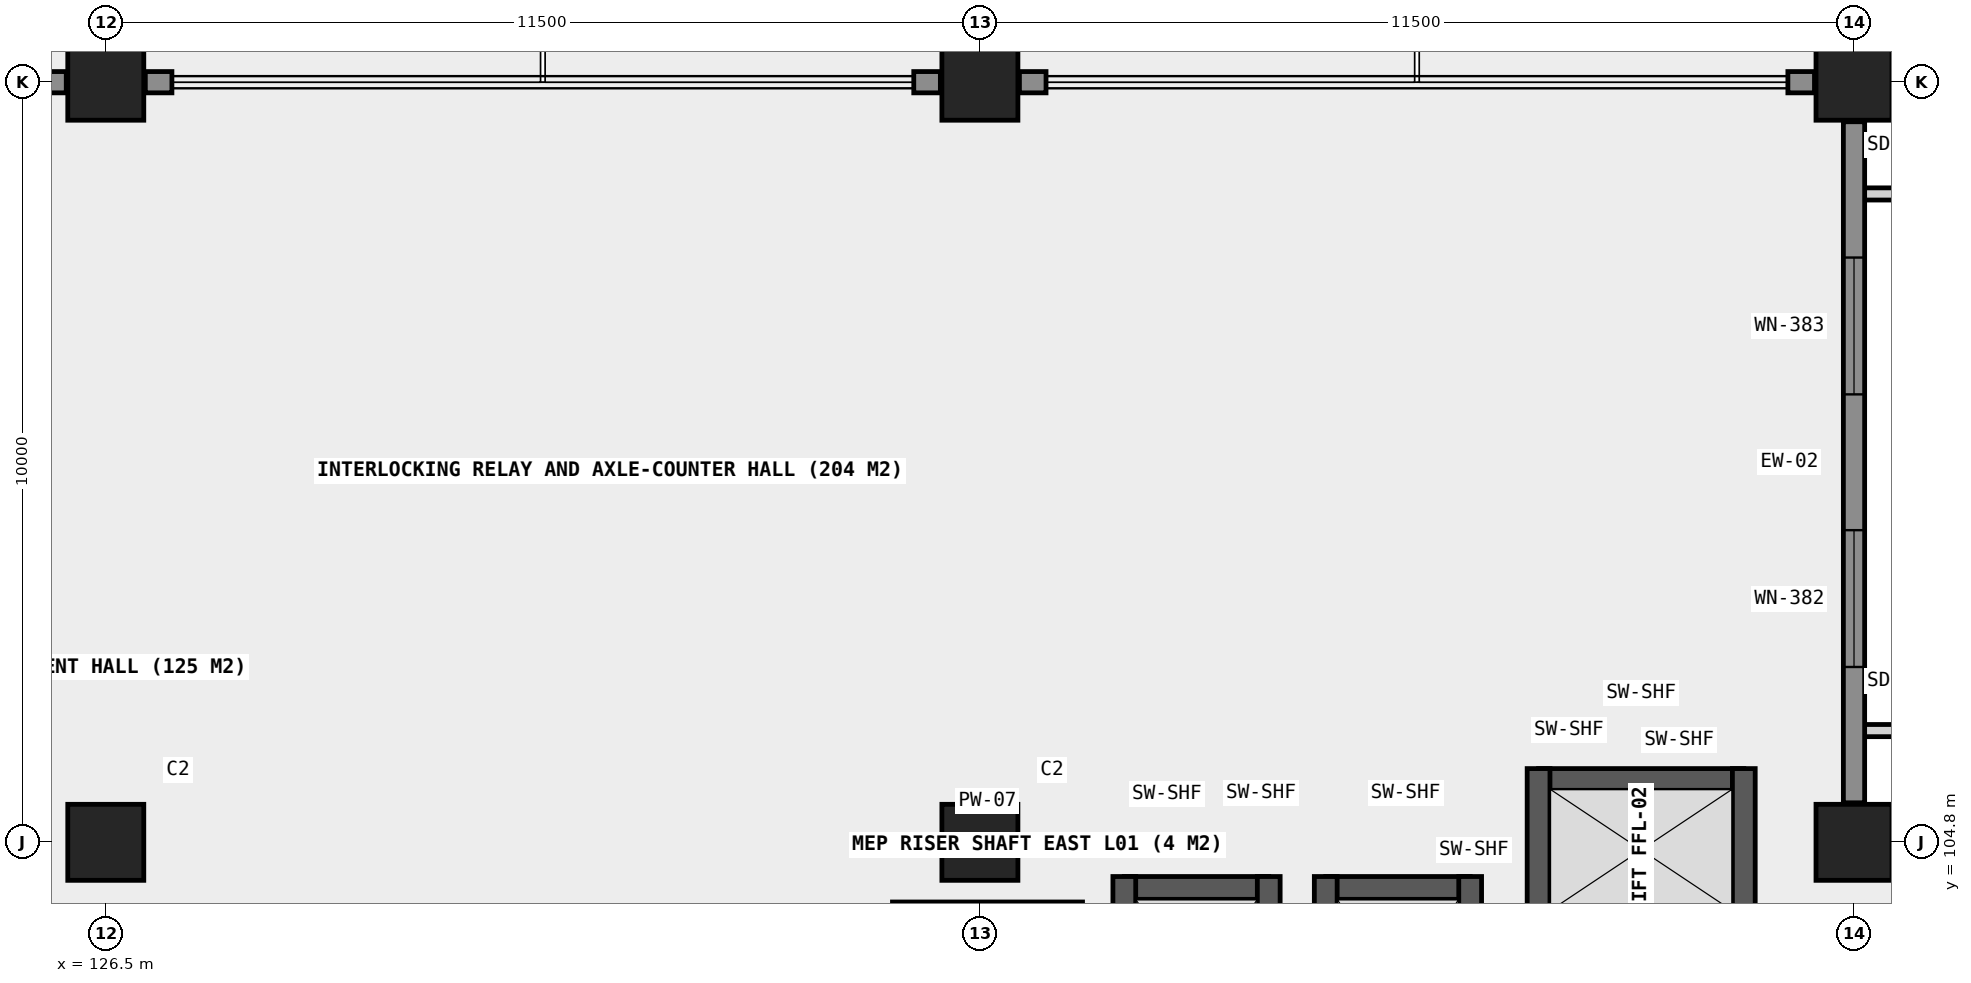
"""IFC4 building model, lengths in metres.
Left out: names, types, materials, properties, quantities, classifications, styles, units other than length and angle.
Written with IfcOpenShell. Run it as: python <this file> out.ifc"""

import sys

from ifc_helpers import new_model, si_unit, direction, frame, frame_2d, origin, origin_2d, place, context, subcontext, project, spatial, rectangle, extrude, element, fill, save


model = new_model("IFC4")
c1 = context("Model", 3, precision=1e-05, world=origin(), true_north=direction((0.0, 1.0)))
c2 = subcontext(c1, "Body", "Model", "MODEL_VIEW")
j1 = project(units=[si_unit("LENGTHUNIT", "METRE"), si_unit("PLANEANGLEUNIT", "RADIAN")], contexts=[c1])
p1 = place(None, origin())
s1 = spatial("IfcSite", under=j1, at=p1, CompositionType="ELEMENT")
p2 = place(p1, origin())
s2 = spatial("IfcBuilding", under=s1, at=p2, CompositionType="ELEMENT")
p3 = place(p2, frame((0.0, 0.0, 4.2)))
s3 = spatial("IfcBuildingStorey", under=s2, at=p3, CompositionType="ELEMENT", Elevation=4.2)
for number, where, z_axis, x_axis in (
    (1, (126.5, 104.8, 0.0), (0.0, 0.0, 1.0), (1.0, 0.0, 0.0)),
    (2, (126.5, 114.8, 0.0), (0.0, 0.0, 1.0), (1.0, 0.0, 0.0)),
    (3, (138.0, 104.8, 0.0), (0.0, 0.0, 1.0), (1.0, 0.0, 0.0)),
    (4, (138.0, 114.8, 0.0), (0.0, 0.0, 1.0), (1.0, 0.0, 0.0)),
    (5, (149.5, 104.8, 0.0), (0.0, 0.0, 1.0), (1.0, 0.0, 0.0)),
    (6, (149.5, 114.8, 0.0), (0.0, 0.0, 1.0), (1.0, 0.0, 0.0)),
):
    element("IfcColumn", number, at=place(p3, frame(where, z_axis=z_axis, x_axis=x_axis)), inside=s3, PredefinedType="COLUMN", context=c2, shape_type="SweptSolid", body=[
        extrude(rectangle(XDim=1.0, YDim=1.0, at=origin_2d()), origin(), (0.0, 0.0, 1.0), 4.2),
    ])
p4 = place(p3, frame((145.35, 105.62, 0.0), z_axis=(0.0, 0.0, 1.0), x_axis=(1.0, 0.0, 0.0)))
e7 = element("IfcWall", 7, at=p4, inside=s3, PredefinedType="SHEAR", context=c2, shape_type="SweptSolid", body=[
    extrude(rectangle(XDim=2.7, YDim=0.3, at=frame_2d((1.35, 0.0))), origin(), (0.0, 0.0, 1.0), 4.2),
])
for number, where, z_axis, x_axis in (
    (8, (145.35, 103.63, 0.0), (0.0, 0.0, 1.0), (0.0, 1.0, 0.0)),
    (9, (148.05, 103.63, 0.0), (0.0, 0.0, 1.0), (0.0, 1.0, 0.0)),
):
    element("IfcWall", number, at=place(p3, frame(where, z_axis=z_axis, x_axis=x_axis)), inside=s3, PredefinedType="SHEAR", context=c2, shape_type="SweptSolid", body=[
        extrude(rectangle(XDim=2.14, YDim=0.3, at=frame_2d((1.07, 0.0))), origin(), (0.0, 0.0, 1.0), 4.2),
    ])
p5 = place(p3, frame((139.9, 104.2, 0.0), z_axis=(0.0, 0.0, 1.0), x_axis=(1.0, 0.0, 0.0)))
e10 = element("IfcWall", 10, at=p5, inside=s3, PredefinedType="SHEAR", context=c2, shape_type="SweptSolid", body=[
    extrude(rectangle(XDim=1.9, YDim=0.3, at=frame_2d((0.95, 0.0))), origin(), (0.0, 0.0, 1.0), 4.2),
])
for number, where, z_axis, x_axis in (
    (11, (139.9, 101.35, 0.0), (0.0, 0.0, 1.0), (0.0, 1.0, 0.0)),
    (12, (141.8, 101.35, 0.0), (0.0, 0.0, 1.0), (0.0, 1.0, 0.0)),
):
    element("IfcWall", number, at=place(p3, frame(where, z_axis=z_axis, x_axis=x_axis)), inside=s3, PredefinedType="SHEAR", context=c2, shape_type="SweptSolid", body=[
        extrude(rectangle(XDim=3.0, YDim=0.3, at=frame_2d((1.5, 0.0))), origin(), (0.0, 0.0, 1.0), 4.2),
    ])
p6 = place(p3, frame((142.55, 104.2, 0.0), z_axis=(0.0, 0.0, 1.0), x_axis=(1.0, 0.0, 0.0)))
e13 = element("IfcWall", 13, at=p6, inside=s3, PredefinedType="SHEAR", context=c2, shape_type="SweptSolid", body=[
    extrude(rectangle(XDim=1.9, YDim=0.3, at=frame_2d((0.95, 0.0))), origin(), (0.0, 0.0, 1.0), 4.2),
])
for number, where, z_axis, x_axis in (
    (14, (142.55, 101.35, 0.0), (0.0, 0.0, 1.0), (0.0, 1.0, 0.0)),
    (15, (144.45, 101.35, 0.0), (0.0, 0.0, 1.0), (0.0, 1.0, 0.0)),
):
    element("IfcWall", number, at=place(p3, frame(where, z_axis=z_axis, x_axis=x_axis)), inside=s3, PredefinedType="SHEAR", context=c2, shape_type="SweptSolid", body=[
        extrude(rectangle(XDim=3.0, YDim=0.3, at=frame_2d((1.5, 0.0))), origin(), (0.0, 0.0, 1.0), 4.2),
    ])
p7 = place(p3, frame((149.5, 105.32, 0.0), z_axis=(0.0, 0.0, 1.0), x_axis=(0.0, 1.0, 0.0)))
e16 = element("IfcWall", 16, at=p7, inside=s3, PredefinedType="SOLIDWALL", context=c2, shape_type="SweptSolid", body=[
    extrude(rectangle(XDim=8.96, YDim=0.28, at=frame_2d((4.48, 0.0))), origin(), (0.0, 0.0, 1.0), 3.15),
])
p8 = place(p7, frame((1.787, 0.0, 1.25)))
e17 = element("IfcOpeningElement", 17, at=p8, cuts=e16, PredefinedType="OPENING", context=c2, shape_type="SweptSolid", body=[
    extrude(rectangle(XDim=1.8, YDim=1.3, at=frame_2d((0.9, 0.65))), frame((0.0, 0.15, 0.0), z_axis=(0.0, -1.0, 0.0), x_axis=(1.0, 0.0, 0.0)), (0.0, 0.0, 1.0), 0.3),
])
p9 = place(p7, frame((5.373, 0.0, 1.25)))
e18 = element("IfcOpeningElement", 18, at=p9, cuts=e16, PredefinedType="OPENING", context=c2, shape_type="SweptSolid", body=[
    extrude(rectangle(XDim=1.8, YDim=1.3, at=frame_2d((0.9, 0.65))), frame((0.0, 0.15, 0.0), z_axis=(0.0, -1.0, 0.0), x_axis=(1.0, 0.0, 0.0)), (0.0, 0.0, 1.0), 0.3),
])
p10 = place(p3, frame((115.52, 114.8, 0.0), z_axis=(0.0, 0.0, 1.0), x_axis=(1.0, 0.0, 0.0)))
e19 = element("IfcWall", 19, at=p10, inside=s3, PredefinedType="SOLIDWALL", context=c2, shape_type="SweptSolid", body=[
    extrude(rectangle(XDim=10.46, YDim=0.28, at=frame_2d((5.23, 0.0))), origin(), (0.0, 0.0, 1.0), 3.15),
])
p11 = place(p10, frame((2.22, 0.0, 1.25)))
e20 = element("IfcOpeningElement", 20, at=p11, cuts=e19, PredefinedType="OPENING", context=c2, shape_type="SweptSolid", body=[
    extrude(rectangle(XDim=1.9, YDim=1.25, at=frame_2d((0.95, 0.625))), frame((0.0, 0.15, 0.0), z_axis=(0.0, -1.0, 0.0), x_axis=(1.0, 0.0, 0.0)), (0.0, 0.0, 1.0), 0.3),
])
p12 = place(p10, frame((6.34, 0.0, 1.25)))
e21 = element("IfcOpeningElement", 21, at=p12, cuts=e19, PredefinedType="OPENING", context=c2, shape_type="SweptSolid", body=[
    extrude(rectangle(XDim=1.9, YDim=1.25, at=frame_2d((0.95, 0.625))), frame((0.0, 0.15, 0.0), z_axis=(0.0, -1.0, 0.0), x_axis=(1.0, 0.0, 0.0)), (0.0, 0.0, 1.0), 0.3),
])
for number, where, z_axis, x_axis in (
    (22, (127.02, 114.8, 0.0), (0.0, 0.0, 1.0), (1.0, 0.0, 0.0)),
    (23, (137.13, 114.8, 0.0), (0.0, 0.0, 1.0), (1.0, 0.0, 0.0)),
    (24, (138.52, 114.8, 0.0), (0.0, 0.0, 1.0), (1.0, 0.0, 0.0)),
    (25, (148.63, 114.8, 0.0), (0.0, 0.0, 1.0), (1.0, 0.0, 0.0)),
):
    element("IfcWall", number, at=place(p3, frame(where, z_axis=z_axis, x_axis=x_axis)), inside=s3, PredefinedType="SOLIDWALL", context=c2, shape_type="SweptSolid", body=[
        extrude(rectangle(XDim=0.35, YDim=0.28, at=frame_2d((0.175, 0.0))), origin(), (0.0, 0.0, 1.0), 3.93),
    ])
p13 = place(p3, frame((136.85, 103.95, 0.0), z_axis=(0.0, 0.0, 1.0), x_axis=(1.0, 0.0, 0.0)))
e26 = element("IfcWall", 26, at=p13, inside=s3, PredefinedType="PLUMBINGWALL", context=c2, shape_type="SweptSolid", body=[
    extrude(rectangle(XDim=2.5, YDim=0.13, at=frame_2d((1.25, 0.0))), origin(), (0.0, 0.0, 1.0), 3.84),
])
p14 = place(p8, origin())
e27 = element("IfcWindow", 27, at=p14, inside=s3, PartitioningType="SINGLE_PANEL", PredefinedType="WINDOW", context=c2, shape_type="SweptSolid", body=[
    extrude(rectangle(XDim=1.8, YDim=1.3, at=frame_2d((0.9, 0.65))), frame((0.0, 0.03, 0.0), z_axis=(0.0, -1.0, 0.0), x_axis=(1.0, 0.0, 0.0)), (0.0, 0.0, 1.0), 0.06),
])
fill(e17, e27)
p15 = place(p9, origin())
e28 = element("IfcWindow", 28, at=p15, inside=s3, PartitioningType="SINGLE_PANEL", PredefinedType="WINDOW", context=c2, shape_type="SweptSolid", body=[
    extrude(rectangle(XDim=1.8, YDim=1.3, at=frame_2d((0.9, 0.65))), frame((0.0, 0.03, 0.0), z_axis=(0.0, -1.0, 0.0), x_axis=(1.0, 0.0, 0.0)), (0.0, 0.0, 1.0), 0.06),
])
fill(e18, e28)
save(model, sys.argv[1])
